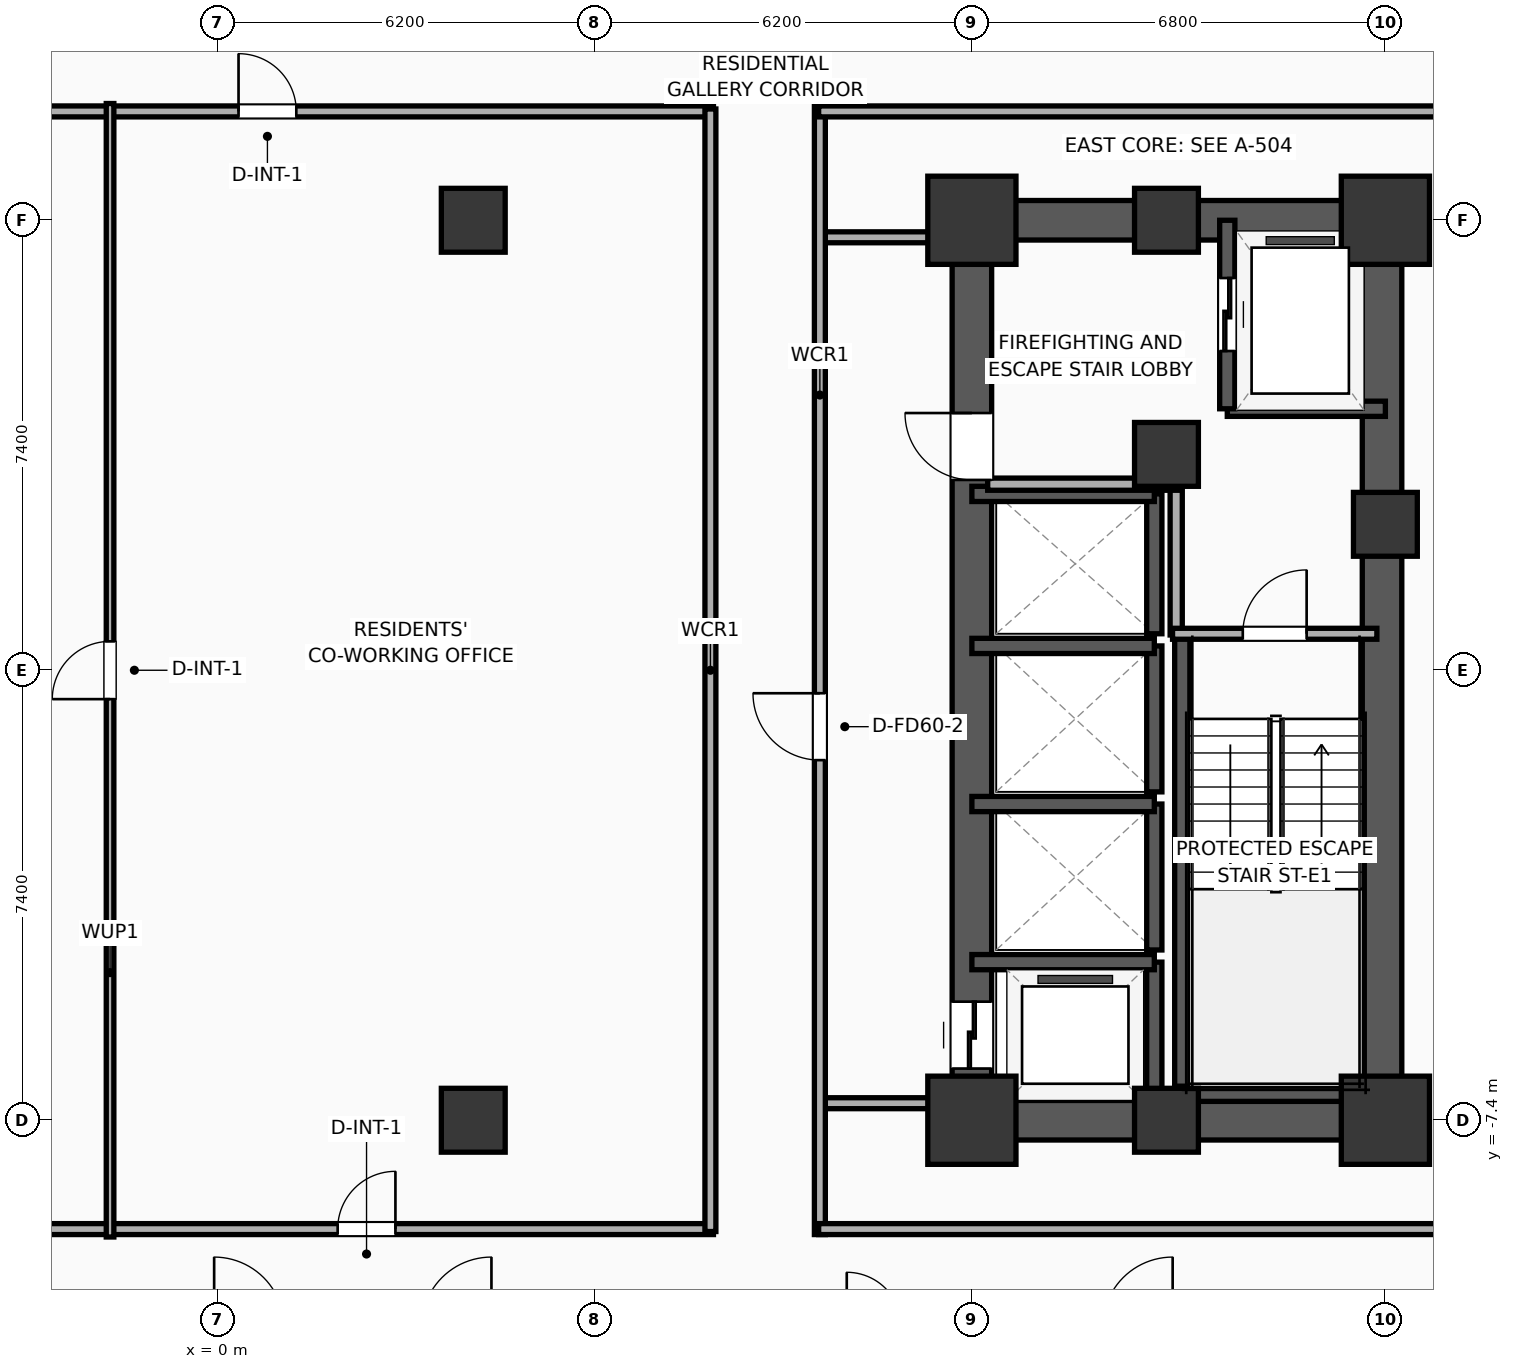
"""IFC4 building model, lengths in metres.
Left out: names, types, materials, properties, quantities, classifications, styles, units other than length and angle.
Written with IfcOpenShell. Run it as: python <this file> out.ifc"""

import sys

from ifc_helpers import new_model, si_unit, direction, frame, frame_2d, origin, origin_2d, place, context, subcontext, project, spatial, rectangle, extrude, element, fill, save


model = new_model("IFC4")
c1 = context("Model", 3, precision=1e-05, world=origin(), true_north=direction((0.0, 1.0)))
c2 = subcontext(c1, "Body", "Model", "MODEL_VIEW")
j1 = project(units=[si_unit("LENGTHUNIT", "METRE"), si_unit("PLANEANGLEUNIT", "RADIAN")], contexts=[c1])
p1 = place(None, origin())
s1 = spatial("IfcSite", under=j1, at=p1, CompositionType="ELEMENT")
p2 = place(p1, origin())
s2 = spatial("IfcBuilding", under=s1, at=p2, CompositionType="ELEMENT")
p3 = place(p2, frame((0.0, 0.0, 61.1)))
s3 = spatial("IfcBuildingStorey", under=s2, at=p3, CompositionType="ELEMENT", Elevation=61.1)
p4 = place(p3, frame((12.4, -7.4, 0.0), z_axis=(0.0, 0.0, 1.0), x_axis=(1.0, 0.0, 0.0)))
e1 = element("IfcColumn", 1, at=p4, inside=s3, PredefinedType="COLUMN", context=c2, shape_type="SweptSolid", body=[
    extrude(rectangle(XDim=1.45, YDim=1.45, at=origin_2d()), origin(), (0.0, 0.0, 1.0), 3.9),
])
p5 = place(p3, frame((15.6, 3.55, 0.0), z_axis=(0.0, 0.0, 1.0), x_axis=(1.0, 0.0, 0.0)))
e2 = element("IfcColumn", 2, at=p5, inside=s3, PredefinedType="COLUMN", context=c2, shape_type="SweptSolid", body=[
    extrude(rectangle(XDim=1.05, YDim=1.05, at=origin_2d()), origin(), (0.0, 0.0, 1.0), 3.9),
])
p6 = place(p3, frame((12.4, 7.4, 0.0), z_axis=(0.0, 0.0, 1.0), x_axis=(1.0, 0.0, 0.0)))
e3 = element("IfcColumn", 3, at=p6, inside=s3, PredefinedType="COLUMN", context=c2, shape_type="SweptSolid", body=[
    extrude(rectangle(XDim=1.45, YDim=1.45, at=origin_2d()), origin(), (0.0, 0.0, 1.0), 3.9),
])
for number, where, z_axis, x_axis in (
    (4, (15.6, -7.4, 0.0), (0.0, 0.0, 1.0), (1.0, 0.0, 0.0)),
    (5, (15.6, 7.4, 0.0), (0.0, 0.0, 1.0), (1.0, 0.0, 0.0)),
):
    element("IfcColumn", number, at=place(p3, frame(where, z_axis=z_axis, x_axis=x_axis)), inside=s3, PredefinedType="COLUMN", context=c2, shape_type="SweptSolid", body=[
        extrude(rectangle(XDim=1.05, YDim=1.05, at=origin_2d()), origin(), (0.0, 0.0, 1.0), 3.9),
    ])
p7 = place(p3, frame((19.2, -7.4, 0.0), z_axis=(0.0, 0.0, 1.0), x_axis=(1.0, 0.0, 0.0)))
e6 = element("IfcColumn", 6, at=p7, inside=s3, PredefinedType="COLUMN", context=c2, shape_type="SweptSolid", body=[
    extrude(rectangle(XDim=1.45, YDim=1.45, at=origin_2d()), origin(), (0.0, 0.0, 1.0), 3.9),
])
p8 = place(p3, frame((19.2, 2.4, 0.0), z_axis=(0.0, 0.0, 1.0), x_axis=(1.0, 0.0, 0.0)))
e7 = element("IfcColumn", 7, at=p8, inside=s3, PredefinedType="COLUMN", context=c2, shape_type="SweptSolid", body=[
    extrude(rectangle(XDim=1.05, YDim=1.05, at=origin_2d()), origin(), (0.0, 0.0, 1.0), 3.9),
])
p9 = place(p3, frame((19.2, 7.4, 0.0), z_axis=(0.0, 0.0, 1.0), x_axis=(1.0, 0.0, 0.0)))
e8 = element("IfcColumn", 8, at=p9, inside=s3, PredefinedType="COLUMN", context=c2, shape_type="SweptSolid", body=[
    extrude(rectangle(XDim=1.45, YDim=1.45, at=origin_2d()), origin(), (0.0, 0.0, 1.0), 3.9),
])
for number, where, z_axis, x_axis in (
    (9, (12.075, -7.4, 0.0), (0.0, 0.0, 1.0), (1.0, 0.0, 0.0)),
    (10, (12.075, 7.4, 0.0), (0.0, 0.0, 1.0), (1.0, 0.0, 0.0)),
):
    element("IfcWall", number, at=place(p3, frame(where, z_axis=z_axis, x_axis=x_axis)), inside=s3, PredefinedType="SHEAR", context=c2, shape_type="SweptSolid", body=[
        extrude(rectangle(XDim=7.45, YDim=0.65, at=frame_2d((3.725, 0.0))), origin(), (0.0, 0.0, 1.0), 3.65),
    ])
p10 = place(p3, frame((12.4, -7.4, 0.0), z_axis=(0.0, 0.0, 1.0), x_axis=(0.0, 1.0, 0.0)))
e11 = element("IfcWall", 11, at=p10, inside=s3, PredefinedType="SHEAR", context=c2, shape_type="SweptSolid", body=[
    extrude(rectangle(XDim=14.8, YDim=0.65, at=frame_2d((7.4, 0.0))), origin(), (0.0, 0.0, 1.0), 3.65),
])
p11 = place(p10, frame((0.85, 0.0, 0.0)))
e12 = element("IfcOpeningElement", 12, at=p11, cuts=e11, PredefinedType="OPENING", context=c2, shape_type="SweptSolid", body=[
    extrude(rectangle(XDim=1.1, YDim=2.05, at=frame_2d((0.55, 1.025))), frame((0.0, 0.335, 0.0), z_axis=(0.0, -1.0, 0.0), x_axis=(1.0, 0.0, 0.0)), (0.0, 0.0, 1.0), 0.67),
])
p12 = place(p10, frame((10.53, 0.0, 0.0)))
e13 = element("IfcOpeningElement", 13, at=p12, cuts=e11, PredefinedType="OPENING", context=c2, shape_type="SweptSolid", body=[
    extrude(rectangle(XDim=1.1, YDim=2.05, at=frame_2d((0.55, 1.025))), frame((0.0, 0.335, 0.0), z_axis=(0.0, -1.0, 0.0), x_axis=(1.0, 0.0, 0.0)), (0.0, 0.0, 1.0), 0.67),
])
p13 = place(p3, frame((19.145, -7.4, 0.0), z_axis=(0.0, 0.0, 1.0), x_axis=(0.0, 1.0, 0.0)))
e14 = element("IfcWall", 14, at=p13, inside=s3, PredefinedType="SHEAR", context=c2, shape_type="SweptSolid", body=[
    extrude(rectangle(XDim=14.8, YDim=0.65, at=frame_2d((7.4, 0.0))), origin(), (0.0, 0.0, 1.0), 3.65),
])
p14 = place(p3, frame((15.86, -7.085, 0.0), z_axis=(0.0, 0.0, 1.0), x_axis=(0.0, 1.0, 0.0)))
e15 = element("IfcWall", 15, at=p14, inside=s3, PredefinedType="SOLIDWALL", context=c2, shape_type="SweptSolid", body=[
    extrude(rectangle(XDim=7.685, YDim=0.25, at=frame_2d((3.843, 0.0))), origin(), (0.0, 0.0, 1.0), 3.65),
])
p15 = place(p3, frame((15.74, -6.965, 0.0), z_axis=(0.0, 0.0, 1.0), x_axis=(1.0, 0.0, 0.0)))
e16 = element("IfcWall", 16, at=p15, inside=s3, PredefinedType="SOLIDWALL", context=c2, shape_type="SweptSolid", body=[
    extrude(rectangle(XDim=3.46, YDim=0.25, at=frame_2d((1.73, 0.0))), origin(), (0.0, 0.0, 1.0), 3.65),
])
for number, where, z_axis, x_axis in (
    (17, (4.2, -7.4, 0.0), (0.0, 0.0, 1.0), (1.0, 0.0, 0.0)),
    (18, (4.2, 7.4, 0.0), (0.0, 0.0, 1.0), (1.0, 0.0, 0.0)),
):
    element("IfcColumn", number, at=place(p3, frame(where, z_axis=z_axis, x_axis=x_axis)), inside=s3, PredefinedType="COLUMN", context=c2, shape_type="SweptSolid", body=[
        extrude(rectangle(XDim=1.05, YDim=1.05, at=origin_2d()), origin(), (0.0, 0.0, 1.0), 3.9),
    ])
p16 = place(p3, frame((16.6, 4.3, 0.0), z_axis=(0.0, 0.0, 1.0), x_axis=(1.0, 0.0, 0.0)))
e19 = element("IfcWall", 19, at=p16, inside=s3, PredefinedType="SOLIDWALL", context=c2, shape_type="SweptSolid", body=[
    extrude(rectangle(XDim=2.6, YDim=0.25, at=frame_2d((1.3, 0.0))), origin(), (0.0, 0.0, 1.0), 3.65),
])
p17 = place(p3, frame((16.6, 7.4, 0.0), z_axis=(0.0, 0.0, 1.0), x_axis=(0.0, -1.0, 0.0)))
e20 = element("IfcWall", 20, at=p17, inside=s3, PredefinedType="SOLIDWALL", context=c2, shape_type="SweptSolid", body=[
    extrude(rectangle(XDim=3.1, YDim=0.25, at=frame_2d((1.55, 0.0))), origin(), (0.0, 0.0, 1.0), 3.65),
])
p18 = place(p17, frame((0.95, 0.0, 0.0)))
e21 = element("IfcOpeningElement", 21, at=p18, cuts=e20, PredefinedType="OPENING", context=c2, shape_type="SweptSolid", body=[
    extrude(rectangle(XDim=1.2, YDim=2.05, at=frame_2d((0.6, 1.025))), frame((0.0, 0.135, 0.0), z_axis=(0.0, -1.0, 0.0), x_axis=(1.0, 0.0, 0.0)), (0.0, 0.0, 1.0), 0.27),
])
p19 = place(p3, frame((15.4, -7.4, 0.0), z_axis=(0.0, 0.0, 1.0), x_axis=(0.0, 1.0, 0.0)))
e22 = element("IfcWall", 22, at=p19, inside=s3, PredefinedType="SOLIDWALL", context=c2, shape_type="SweptSolid", body=[
    extrude(rectangle(XDim=2.6, YDim=0.25, at=frame_2d((1.3, 0.0))), origin(), (0.0, 0.0, 1.0), 3.65),
])
p20 = place(p3, frame((15.4, -4.8, 0.0), z_axis=(0.0, 0.0, 1.0), x_axis=(-1.0, 0.0, 0.0)))
e23 = element("IfcWall", 23, at=p20, inside=s3, PredefinedType="SOLIDWALL", context=c2, shape_type="SweptSolid", body=[
    extrude(rectangle(XDim=3.0, YDim=0.25, at=frame_2d((1.5, 0.0))), origin(), (0.0, 0.0, 1.0), 3.65),
])
p21 = place(p3, frame((15.4, -4.6, 0.0), z_axis=(0.0, 0.0, 1.0), x_axis=(0.0, 1.0, 0.0)))
e24 = element("IfcWall", 24, at=p21, inside=s3, PredefinedType="SOLIDWALL", context=c2, shape_type="SweptSolid", body=[
    extrude(rectangle(XDim=2.4, YDim=0.25, at=frame_2d((1.2, 0.0))), origin(), (0.0, 0.0, 1.0), 3.65),
])
p22 = place(p3, frame((15.4, -2.2, 0.0), z_axis=(0.0, 0.0, 1.0), x_axis=(-1.0, 0.0, 0.0)))
e25 = element("IfcWall", 25, at=p22, inside=s3, PredefinedType="SOLIDWALL", context=c2, shape_type="SweptSolid", body=[
    extrude(rectangle(XDim=3.0, YDim=0.25, at=frame_2d((1.5, 0.0))), origin(), (0.0, 0.0, 1.0), 3.65),
])
p23 = place(p3, frame((15.4, -2.0, 0.0), z_axis=(0.0, 0.0, 1.0), x_axis=(0.0, 1.0, 0.0)))
e26 = element("IfcWall", 26, at=p23, inside=s3, PredefinedType="SOLIDWALL", context=c2, shape_type="SweptSolid", body=[
    extrude(rectangle(XDim=2.4, YDim=0.25, at=frame_2d((1.2, 0.0))), origin(), (0.0, 0.0, 1.0), 3.65),
])
p24 = place(p3, frame((15.4, 0.4, 0.0), z_axis=(0.0, 0.0, 1.0), x_axis=(-1.0, 0.0, 0.0)))
e27 = element("IfcWall", 27, at=p24, inside=s3, PredefinedType="SOLIDWALL", context=c2, shape_type="SweptSolid", body=[
    extrude(rectangle(XDim=3.0, YDim=0.25, at=frame_2d((1.5, 0.0))), origin(), (0.0, 0.0, 1.0), 3.65),
])
p25 = place(p3, frame((15.4, 0.6, 0.0), z_axis=(0.0, 0.0, 1.0), x_axis=(0.0, 1.0, 0.0)))
e28 = element("IfcWall", 28, at=p25, inside=s3, PredefinedType="SOLIDWALL", context=c2, shape_type="SweptSolid", body=[
    extrude(rectangle(XDim=2.3, YDim=0.25, at=frame_2d((1.15, 0.0))), origin(), (0.0, 0.0, 1.0), 3.65),
])
p26 = place(p3, frame((15.4, 2.9, 0.0), z_axis=(0.0, 0.0, 1.0), x_axis=(-1.0, 0.0, 0.0)))
e29 = element("IfcWall", 29, at=p26, inside=s3, PredefinedType="SOLIDWALL", context=c2, shape_type="SweptSolid", body=[
    extrude(rectangle(XDim=3.0, YDim=0.25, at=frame_2d((1.5, 0.0))), origin(), (0.0, 0.0, 1.0), 3.65),
])
p27 = place(p3, frame((15.76, 0.58, 0.0), z_axis=(0.0, 0.0, 1.0), x_axis=(0.0, 1.0, 0.0)))
e30 = element("IfcWall", 30, at=p27, inside=s3, PredefinedType="PARTITIONING", context=c2, shape_type="SweptSolid", body=[
    extrude(rectangle(XDim=2.52, YDim=0.2, at=frame_2d((1.26, 0.0))), origin(), (0.0, 0.0, 1.0), 3.65),
])
p28 = place(p3, frame((12.66, 3.06, 0.0), z_axis=(0.0, 0.0, 1.0), x_axis=(1.0, 0.0, 0.0)))
e31 = element("IfcWall", 31, at=p28, inside=s3, PredefinedType="PARTITIONING", context=c2, shape_type="SweptSolid", body=[
    extrude(rectangle(XDim=3.16, YDim=0.2, at=frame_2d((1.58, 0.0))), origin(), (0.0, 0.0, 1.0), 3.65),
])
p29 = place(p3, frame((15.7, 0.6, 0.0), z_axis=(0.0, 0.0, 1.0), x_axis=(1.0, 0.0, 0.0)))
e32 = element("IfcWall", 32, at=p29, inside=s3, PredefinedType="PARTITIONING", context=c2, shape_type="SweptSolid", body=[
    extrude(rectangle(XDim=3.36, YDim=0.18, at=frame_2d((1.68, 0.0))), origin(), (0.0, 0.0, 1.0), 3.65),
])
p30 = place(p29, frame((1.155, 0.0, 0.0)))
e33 = element("IfcOpeningElement", 33, at=p30, cuts=e32, PredefinedType="OPENING", context=c2, shape_type="SweptSolid", body=[
    extrude(rectangle(XDim=1.05, YDim=2.05, at=frame_2d((0.525, 1.025))), frame((0.0, 0.1, 0.0), z_axis=(0.0, -1.0, 0.0), x_axis=(1.0, 0.0, 0.0)), (0.0, 0.0, 1.0), 0.2),
])
for number, where, z_axis, x_axis in (
    (34, (9.88, 7.12, 0.0), (0.0, 0.0, 1.0), (1.0, 0.0, 0.0)),
    (35, (9.88, -7.12, 0.0), (0.0, 0.0, 1.0), (1.0, 0.0, 0.0)),
):
    element("IfcWall", number, at=place(p3, frame(where, z_axis=z_axis, x_axis=x_axis)), inside=s3, PredefinedType="PARTITIONING", context=c2, shape_type="SweptSolid", body=[
        extrude(rectangle(XDim=2.27, YDim=0.18, at=frame_2d((1.135, 0.0))), origin(), (0.0, 0.0, 1.0), 2.94),
    ])
p31 = place(p3, frame((9.9, -9.28, 0.0), z_axis=(0.0, 0.0, 1.0), x_axis=(0.0, 1.0, 0.0)))
e36 = element("IfcWall", 36, at=p31, inside=s3, PredefinedType="PARTITIONING", context=c2, shape_type="SweptSolid", body=[
    extrude(rectangle(XDim=18.56, YDim=0.18, at=frame_2d((9.28, 0.0))), origin(), (0.0, 0.0, 1.0), 3.65),
])
p32 = place(p31, frame((7.802, 0.0, 0.0)))
e37 = element("IfcOpeningElement", 37, at=p32, cuts=e36, PredefinedType="OPENING", context=c2, shape_type="SweptSolid", body=[
    extrude(rectangle(XDim=1.1, YDim=2.05, at=frame_2d((0.55, 1.025))), frame((0.0, 0.1, 0.0), z_axis=(0.0, -1.0, 0.0), x_axis=(1.0, 0.0, 0.0)), (0.0, 0.0, 1.0), 0.2),
])
p33 = place(p3, frame((9.88, 9.19, 0.0), z_axis=(0.0, 0.0, 1.0), x_axis=(1.0, 0.0, 0.0)))
e38 = element("IfcWall", 38, at=p33, inside=s3, PredefinedType="PARTITIONING", context=c2, shape_type="SweptSolid", body=[
    extrude(rectangle(XDim=16.33, YDim=0.18, at=frame_2d((8.165, 0.0))), origin(), (0.0, 0.0, 1.0), 3.65),
])
p34 = place(p33, frame((13.99, 0.0, 0.0)))
e39 = element("IfcOpeningElement", 39, at=p34, cuts=e38, PredefinedType="OPENING", context=c2, shape_type="SweptSolid", body=[
    extrude(rectangle(XDim=0.9, YDim=2.05, at=frame_2d((0.45, 1.025))), frame((0.0, 0.1, 0.0), z_axis=(0.0, -1.0, 0.0), x_axis=(1.0, 0.0, 0.0)), (0.0, 0.0, 1.0), 0.2),
])
p35 = place(p3, frame((9.88, -9.19, 0.0), z_axis=(0.0, 0.0, 1.0), x_axis=(1.0, 0.0, 0.0)))
e40 = element("IfcWall", 40, at=p35, inside=s3, PredefinedType="PARTITIONING", context=c2, shape_type="SweptSolid", body=[
    extrude(rectangle(XDim=16.33, YDim=0.18, at=frame_2d((8.165, 0.0))), origin(), (0.0, 0.0, 1.0), 3.65),
])
p36 = place(p3, frame((-8.15, 9.19, 0.0), z_axis=(0.0, 0.0, 1.0), x_axis=(1.0, 0.0, 0.0)))
e41 = element("IfcWall", 41, at=p36, inside=s3, PredefinedType="PARTITIONING", context=c2, shape_type="SweptSolid", body=[
    extrude(rectangle(XDim=16.3, YDim=0.18, at=frame_2d((8.15, 0.0))), origin(), (0.0, 0.0, 1.0), 3.65),
])
p37 = place(p36, frame((8.49, 0.0, 0.0)))
e42 = element("IfcOpeningElement", 42, at=p37, cuts=e41, PredefinedType="OPENING", context=c2, shape_type="SweptSolid", body=[
    extrude(rectangle(XDim=0.95, YDim=2.05, at=frame_2d((0.475, 1.025))), frame((0.0, 0.1, 0.0), z_axis=(0.0, -1.0, 0.0), x_axis=(1.0, 0.0, 0.0)), (0.0, 0.0, 1.0), 0.2),
])
p38 = place(p3, frame((-8.15, -9.19, 0.0), z_axis=(0.0, 0.0, 1.0), x_axis=(1.0, 0.0, 0.0)))
e43 = element("IfcWall", 43, at=p38, inside=s3, PredefinedType="PARTITIONING", context=c2, shape_type="SweptSolid", body=[
    extrude(rectangle(XDim=16.3, YDim=0.18, at=frame_2d((8.15, 0.0))), origin(), (0.0, 0.0, 1.0), 3.65),
])
p39 = place(p38, frame((1.13, 0.0, 0.0)))
e44 = element("IfcOpeningElement", 44, at=p39, cuts=e43, PredefinedType="OPENING", context=c2, shape_type="SweptSolid", body=[
    extrude(rectangle(XDim=1.0, YDim=2.05, at=frame_2d((0.5, 1.025))), frame((0.0, 0.1, 0.0), z_axis=(0.0, -1.0, 0.0), x_axis=(1.0, 0.0, 0.0)), (0.0, 0.0, 1.0), 0.2),
])
p40 = place(p38, frame((10.12, 0.0, 0.0)))
e45 = element("IfcOpeningElement", 45, at=p40, cuts=e43, PredefinedType="OPENING", context=c2, shape_type="SweptSolid", body=[
    extrude(rectangle(XDim=0.95, YDim=2.05, at=frame_2d((0.475, 1.025))), frame((0.0, 0.1, 0.0), z_axis=(0.0, -1.0, 0.0), x_axis=(1.0, 0.0, 0.0)), (0.0, 0.0, 1.0), 0.2),
])
p41 = place(p3, frame((8.1, -9.23, 0.0), z_axis=(0.0, 0.0, 1.0), x_axis=(0.0, 1.0, 0.0)))
e46 = element("IfcWall", 46, at=p41, inside=s3, PredefinedType="PARTITIONING", context=c2, shape_type="SweptSolid", body=[
    extrude(rectangle(XDim=18.46, YDim=0.18, at=frame_2d((9.23, 0.0))), origin(), (0.0, 0.0, 1.0), 3.65),
])
p42 = place(p3, frame((-1.773, -9.32, 0.0), z_axis=(0.0, 0.0, 1.0), x_axis=(0.0, 1.0, 0.0)))
e47 = element("IfcWall", 47, at=p42, inside=s3, PredefinedType="PARTITIONING", context=c2, shape_type="SweptSolid", body=[
    extrude(rectangle(XDim=18.64, YDim=0.125, at=frame_2d((9.32, 0.0))), origin(), (0.0, 0.0, 1.0), 3.65),
])
p43 = place(p42, frame((8.845, 0.0, 0.0)))
e48 = element("IfcOpeningElement", 48, at=p43, cuts=e47, PredefinedType="OPENING", context=c2, shape_type="SweptSolid", body=[
    extrude(rectangle(XDim=0.95, YDim=2.05, at=frame_2d((0.475, 1.025))), frame((0.0, 0.073, 0.0), z_axis=(0.0, -1.0, 0.0), x_axis=(1.0, 0.0, 0.0)), (0.0, 0.0, 1.0), 0.145),
])
p44 = place(p18, origin())
e49 = element("IfcDoor", 49, at=p44, inside=s3, OperationType="SLIDING_TO_LEFT", PredefinedType="DOOR", context=c2, shape_type="SweptSolid", body=[
    extrude(rectangle(XDim=1.2, YDim=2.05, at=frame_2d((0.6, 1.025))), frame((0.0, 0.025, 0.0), z_axis=(0.0, -1.0, 0.0), x_axis=(1.0, 0.0, 0.0)), (0.0, 0.0, 1.0), 0.05),
])
fill(e21, e49)
p45 = place(p11, origin())
e50 = element("IfcDoor", 50, at=p45, inside=s3, OperationType="SLIDING_TO_LEFT", PredefinedType="DOOR", context=c2, shape_type="SweptSolid", body=[
    extrude(rectangle(XDim=1.1, YDim=2.05, at=frame_2d((0.55, 1.025))), frame((0.0, 0.025, 0.0), z_axis=(0.0, -1.0, 0.0), x_axis=(1.0, 0.0, 0.0)), (0.0, 0.0, 1.0), 0.05),
])
fill(e12, e50)
p46 = place(p30, origin())
e51 = element("IfcDoor", 51, at=p46, inside=s3, OperationType="SINGLE_SWING_RIGHT", PredefinedType="DOOR", context=c2, shape_type="SweptSolid", body=[
    extrude(rectangle(XDim=1.05, YDim=2.05, at=frame_2d((0.525, 1.025))), frame((0.0, 0.025, 0.0), z_axis=(0.0, -1.0, 0.0), x_axis=(1.0, 0.0, 0.0)), (0.0, 0.0, 1.0), 0.05),
])
fill(e33, e51)
p47 = place(p32, origin())
e52 = element("IfcDoor", 52, at=p47, inside=s3, OperationType="SINGLE_SWING_RIGHT", PredefinedType="DOOR", context=c2, shape_type="SweptSolid", body=[
    extrude(rectangle(XDim=1.1, YDim=2.05, at=frame_2d((0.55, 1.025))), frame((0.0, 0.025, 0.0), z_axis=(0.0, -1.0, 0.0), x_axis=(1.0, 0.0, 0.0)), (0.0, 0.0, 1.0), 0.05),
])
fill(e37, e52)
p48 = place(p37, origin())
e53 = element("IfcDoor", 53, at=p48, inside=s3, OperationType="SINGLE_SWING_LEFT", PredefinedType="DOOR", context=c2, shape_type="SweptSolid", body=[
    extrude(rectangle(XDim=0.95, YDim=2.05, at=frame_2d((0.475, 1.025))), frame((0.0, 0.025, 0.0), z_axis=(0.0, -1.0, 0.0), x_axis=(1.0, 0.0, 0.0)), (0.0, 0.0, 1.0), 0.05),
])
fill(e42, e53)
p49 = place(p40, origin())
e54 = element("IfcDoor", 54, at=p49, inside=s3, OperationType="SINGLE_SWING_RIGHT", PredefinedType="DOOR", context=c2, shape_type="SweptSolid", body=[
    extrude(rectangle(XDim=0.95, YDim=2.05, at=frame_2d((0.475, 1.025))), frame((0.0, 0.025, 0.0), z_axis=(0.0, -1.0, 0.0), x_axis=(1.0, 0.0, 0.0)), (0.0, 0.0, 1.0), 0.05),
])
fill(e45, e54)
p50 = place(p43, origin())
e55 = element("IfcDoor", 55, at=p50, inside=s3, OperationType="SINGLE_SWING_LEFT", PredefinedType="DOOR", context=c2, shape_type="SweptSolid", body=[
    extrude(rectangle(XDim=0.95, YDim=2.05, at=frame_2d((0.475, 1.025))), frame((0.0, 0.025, 0.0), z_axis=(0.0, -1.0, 0.0), x_axis=(1.0, 0.0, 0.0)), (0.0, 0.0, 1.0), 0.05),
])
fill(e48, e55)
p51 = place(p12, origin())
e56 = element("IfcDoor", 56, at=p51, inside=s3, OperationType="SINGLE_SWING_RIGHT", PredefinedType="DOOR", context=c2, shape_type="SweptSolid", body=[
    extrude(rectangle(XDim=1.1, YDim=2.05, at=frame_2d((0.55, 1.025))), frame((0.0, 0.025, 0.0), z_axis=(0.0, -1.0, 0.0), x_axis=(1.0, 0.0, 0.0)), (0.0, 0.0, 1.0), 0.05),
])
fill(e13, e56)
save(model, sys.argv[1])
